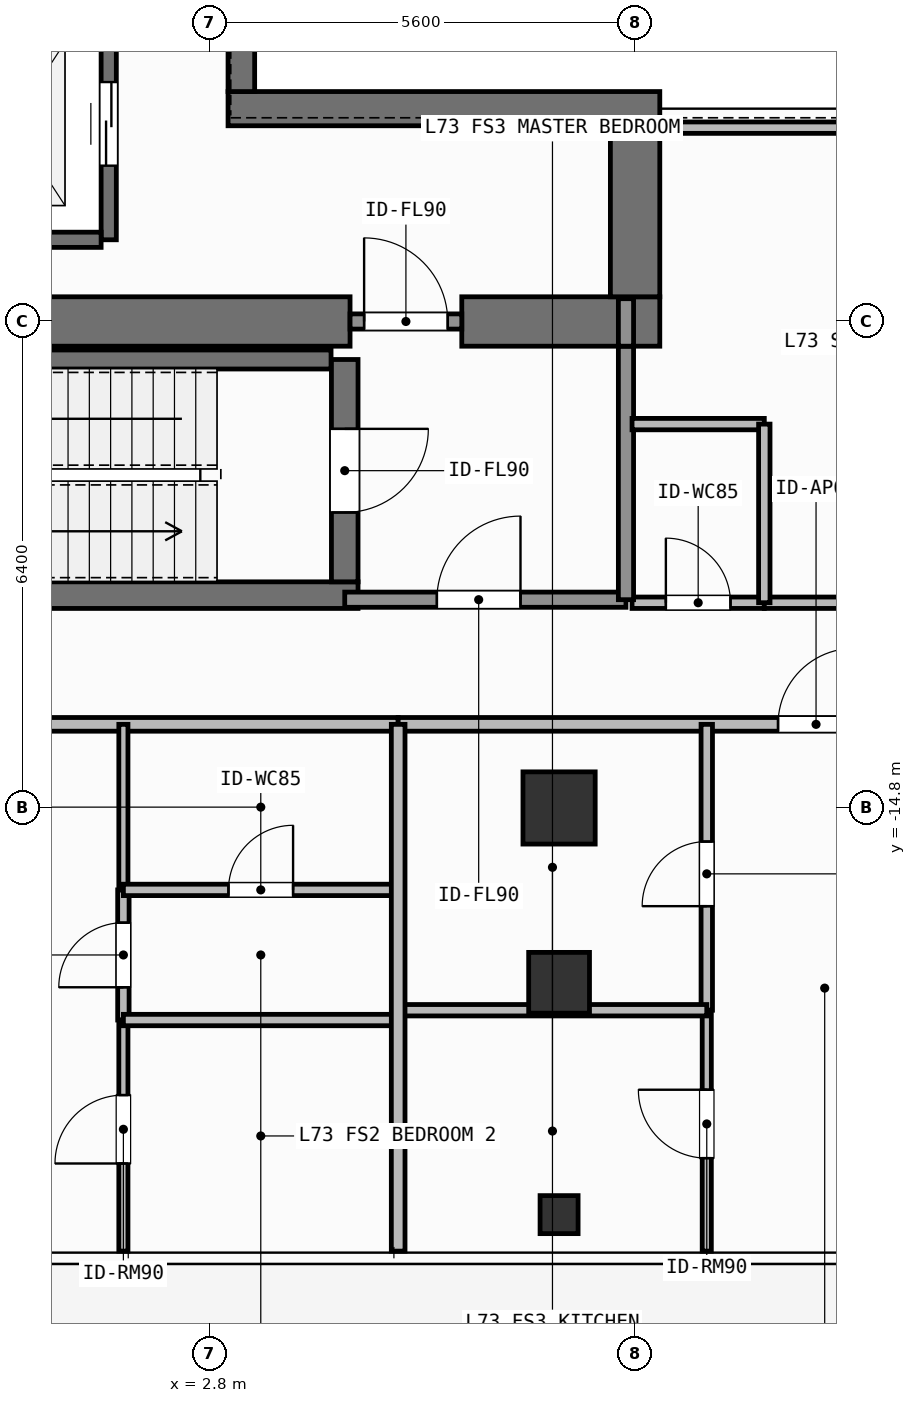
"""IFC4 building model, lengths in metres.
Left out: names, types, materials, properties, quantities, classifications, styles, units other than length and angle.
Written with IfcOpenShell. Run it as: python <this file> out.ifc"""

import sys

from ifc_helpers import new_model, si_unit, direction, frame, frame_2d, origin, origin_2d, place, context, subcontext, project, spatial, rectangle, hollow_rectangle, extrude, element, fill, save


model = new_model("IFC4")
c1 = context("Model", 3, precision=1e-05, world=origin(), true_north=direction((0.0, 1.0)))
c2 = subcontext(c1, "Body", "Model", "MODEL_VIEW")
j1 = project(units=[si_unit("LENGTHUNIT", "METRE"), si_unit("PLANEANGLEUNIT", "RADIAN")], contexts=[c1])
p1 = place(None, origin())
s1 = spatial("IfcSite", under=j1, at=p1, CompositionType="ELEMENT")
p2 = place(p1, origin())
s2 = spatial("IfcBuilding", under=s1, at=p2, CompositionType="ELEMENT")
p3 = place(p2, frame((0.0, 0.0, 297.6)))
s3 = spatial("IfcBuildingStorey", under=s2, at=p3, CompositionType="ELEMENT", Elevation=297.6)
p4 = place(p3, frame((-2.62, -8.4, 0.0), z_axis=(0.0, 0.0, 1.0), x_axis=(1.0, 0.0, 0.0)))
e1 = element("IfcWall", 1, at=p4, inside=s3, PredefinedType="SHEAR", context=c2, shape_type="SweptSolid", body=[
    extrude(rectangle(XDim=7.27, YDim=0.65, at=frame_2d((3.635, 0.0))), origin(), (0.0, 0.0, 1.0), 3.9),
])
p5 = place(p3, frame((6.12, -8.4, 0.0), z_axis=(0.0, 0.0, 1.0), x_axis=(1.0, 0.0, 0.0)))
e2 = element("IfcWall", 2, at=p5, inside=s3, PredefinedType="SHEAR", context=c2, shape_type="SweptSolid", body=[
    extrude(rectangle(XDim=2.605, YDim=0.65, at=frame_2d((1.302, 0.0))), origin(), (0.0, 0.0, 1.0), 3.9),
])
p6 = place(p3, frame((8.4, -8.075, 0.0), z_axis=(0.0, 0.0, 1.0), x_axis=(0.0, 1.0, 0.0)))
e3 = element("IfcWall", 3, at=p6, inside=s3, PredefinedType="SHEAR", context=c2, shape_type="SweptSolid", body=[
    extrude(rectangle(XDim=2.25, YDim=0.65, at=frame_2d((1.125, 0.0))), origin(), (0.0, 0.0, 1.0), 3.9),
])
p7 = place(p3, frame((3.045, -5.6, 0.0), z_axis=(0.0, 0.0, 1.0), x_axis=(1.0, 0.0, 0.0)))
e4 = element("IfcWall", 4, at=p7, inside=s3, PredefinedType="SHEAR", context=c2, shape_type="SweptSolid", body=[
    extrude(rectangle(XDim=5.68, YDim=0.45, at=frame_2d((2.84, 0.0))), origin(), (0.0, 0.0, 1.0), 3.9),
])
p8 = place(p3, frame((3.22, -5.375, 0.0), z_axis=(0.0, 0.0, 1.0), x_axis=(0.0, 1.0, 0.0)))
e5 = element("IfcWall", 5, at=p8, inside=s3, PredefinedType="SHEAR", context=c2, shape_type="SweptSolid", body=[
    extrude(rectangle(XDim=10.75, YDim=0.35, at=frame_2d((5.375, 0.0))), origin(), (0.0, 0.0, 1.0), 3.9),
])
p9 = place(p3, frame((-2.555, -12.0, 0.0), z_axis=(0.0, 0.0, 1.0), x_axis=(1.0, 0.0, 0.0)))
e6 = element("IfcWall", 6, at=p9, inside=s3, PredefinedType="SHEAR", context=c2, shape_type="SweptSolid", body=[
    extrude(rectangle(XDim=7.31, YDim=0.35, at=frame_2d((3.655, 0.0))), origin(), (0.0, 0.0, 1.0), 3.9),
])
p10 = place(p3, frame((-2.2, -8.9, 0.0), z_axis=(0.0, 0.0, 1.0), x_axis=(1.0, 0.0, 0.0)))
e7 = element("IfcWall", 7, at=p10, inside=s3, PredefinedType="SHEAR", context=c2, shape_type="SweptSolid", body=[
    extrude(rectangle(XDim=6.6, YDim=0.25, at=frame_2d((3.3, 0.0))), origin(), (0.0, 0.0, 1.0), 3.9),
])
p11 = place(p3, frame((4.58, -8.9, 0.0), z_axis=(0.0, 0.0, 1.0), x_axis=(0.0, -1.0, 0.0)))
e8 = element("IfcWall", 8, at=p11, inside=s3, PredefinedType="SHEAR", context=c2, shape_type="SweptSolid", body=[
    extrude(rectangle(XDim=2.925, YDim=0.35, at=frame_2d((1.462, 0.0))), origin(), (0.0, 0.0, 1.0), 3.9),
])
p12 = place(p11, frame((0.913, 0.0, 0.0)))
e9 = element("IfcOpeningElement", 9, at=p12, cuts=e8, PredefinedType="OPENING", context=c2, shape_type="SweptSolid", body=[
    extrude(rectangle(XDim=1.1, YDim=2.15, at=frame_2d((0.55, 1.075))), frame((0.0, 0.185, 0.0), z_axis=(0.0, -1.0, 0.0), x_axis=(1.0, 0.0, 0.0)), (0.0, 0.0, 1.0), 0.37),
])
p13 = place(p3, frame((7.4, -14.8, 0.0), z_axis=(0.0, 0.0, 1.0), x_axis=(1.0, 0.0, 0.0)))
e10 = element("IfcColumn", 10, at=p13, inside=s3, PredefinedType="COLUMN", context=c2, shape_type="SweptSolid", body=[
    extrude(rectangle(XDim=0.95, YDim=0.95, at=origin_2d()), origin(), (0.0, 0.0, 1.0), 3.9),
])
p14 = place(p3, frame((7.4, -17.1, 0.0), z_axis=(0.0, 0.0, 1.0), x_axis=(1.0, 0.0, 0.0)))
e11 = element("IfcColumn", 11, at=p14, inside=s3, PredefinedType="COLUMN", context=c2, shape_type="SweptSolid", body=[
    extrude(hollow_rectangle(XDim=0.8, YDim=0.8, WallThickness=0.036, at=origin_2d()), origin(), (0.0, 0.0, 1.0), 3.9),
])
p15 = place(p3, frame((7.4, -20.15, 0.0), z_axis=(0.0, 0.0, 1.0), x_axis=(1.0, 0.0, 0.0)))
e12 = element("IfcColumn", 12, at=p15, inside=s3, PredefinedType="COLUMN", context=c2, shape_type="SweptSolid", body=[
    extrude(hollow_rectangle(XDim=0.5, YDim=0.5, WallThickness=0.025, at=origin_2d()), origin(), (0.0, 0.0, 1.0), 3.9),
])
p16 = place(p3, frame((1.475, -7.325, 0.0), z_axis=(0.0, 0.0, 1.0), x_axis=(0.0, 1.0, 0.0)))
e13 = element("IfcWall", 13, at=p16, inside=s3, PredefinedType="SHEAR", context=c2, shape_type="SweptSolid", body=[
    extrude(rectangle(XDim=3.05, YDim=0.2, at=frame_2d((1.525, 0.0))), origin(), (0.0, 0.0, 1.0), 3.68),
])
p17 = place(p16, frame((0.975, 0.0, 0.0)))
e14 = element("IfcOpeningElement", 14, at=p17, cuts=e13, PredefinedType="OPENING", context=c2, shape_type="SweptSolid", body=[
    extrude(rectangle(XDim=1.1, YDim=2.2, at=frame_2d((0.55, 1.1))), frame((0.0, 0.11, 0.0), z_axis=(0.0, -1.0, 0.0), x_axis=(1.0, 0.0, 0.0)), (0.0, 0.0, 1.0), 0.22),
])
p18 = place(p3, frame((-0.975, -7.325, 0.0), z_axis=(0.0, 0.0, 1.0), x_axis=(1.0, 0.0, 0.0)))
e15 = element("IfcWall", 15, at=p18, inside=s3, PredefinedType="SHEAR", context=c2, shape_type="SweptSolid", body=[
    extrude(rectangle(XDim=2.35, YDim=0.2, at=frame_2d((1.175, 0.0))), origin(), (0.0, 0.0, 1.0), 3.68),
])
p19 = place(p3, frame((4.58, -12.06, 0.0), z_axis=(0.0, 0.0, 1.0), x_axis=(1.0, 0.0, 0.0)))
e16 = element("IfcWall", 16, at=p19, inside=s3, PredefinedType="SOLIDWALL", context=c2, shape_type="SweptSolid", body=[
    extrude(rectangle(XDim=3.7, YDim=0.2, at=frame_2d((1.85, 0.0))), origin(), (0.0, 0.0, 1.0), 3.68),
])
p20 = place(p19, frame((1.212, 0.0, 0.0)))
e17 = element("IfcOpeningElement", 17, at=p20, cuts=e16, PredefinedType="OPENING", context=c2, shape_type="SweptSolid", body=[
    extrude(rectangle(XDim=1.1, YDim=2.15, at=frame_2d((0.55, 1.075))), frame((0.0, 0.11, 0.0), z_axis=(0.0, -1.0, 0.0), x_axis=(1.0, 0.0, 0.0)), (0.0, 0.0, 1.0), 0.22),
])
p21 = place(p3, frame((4.65, -8.4, 0.0), z_axis=(0.0, 0.0, 1.0), x_axis=(1.0, 0.0, 0.0)))
e18 = element("IfcWall", 18, at=p21, inside=s3, PredefinedType="SOLIDWALL", context=c2, shape_type="SweptSolid", body=[
    extrude(rectangle(XDim=1.47, YDim=0.2, at=frame_2d((0.735, 0.0))), origin(), (0.0, 0.0, 1.0), 2.92),
])
p22 = place(p21, frame((0.185, 0.0, 0.0)))
e19 = element("IfcOpeningElement", 19, at=p22, cuts=e18, PredefinedType="OPENING", context=c2, shape_type="SweptSolid", body=[
    extrude(rectangle(XDim=1.1, YDim=2.15, at=frame_2d((0.55, 1.075))), frame((0.0, 0.11, 0.0), z_axis=(0.0, -1.0, 0.0), x_axis=(1.0, 0.0, 0.0)), (0.0, 0.0, 1.0), 0.22),
])
p23 = place(p3, frame((8.36, -12.1, 0.0), z_axis=(0.0, 0.0, 1.0), x_axis=(1.0, 0.0, 0.0)))
e20 = element("IfcWall", 20, at=p23, inside=s3, PredefinedType="PARTITIONING", context=c2, shape_type="SweptSolid", body=[
    extrude(rectangle(XDim=1.74, YDim=0.15, at=frame_2d((0.87, 0.0))), origin(), (0.0, 0.0, 1.0), 3.68),
])
p24 = place(p23, frame((0.445, 0.0, 0.0)))
e21 = element("IfcOpeningElement", 21, at=p24, cuts=e20, PredefinedType="OPENING", context=c2, shape_type="SweptSolid", body=[
    extrude(rectangle(XDim=0.85, YDim=2.1, at=frame_2d((0.425, 1.05))), frame((0.0, 0.085, 0.0), z_axis=(0.0, -1.0, 0.0), x_axis=(1.0, 0.0, 0.0)), (0.0, 0.0, 1.0), 0.17),
])
p25 = place(p3, frame((10.1, -12.1, 0.0), z_axis=(0.0, 0.0, 1.0), x_axis=(1.0, 0.0, 0.0)))
e22 = element("IfcWall", 22, at=p25, inside=s3, PredefinedType="PARTITIONING", context=c2, shape_type="SweptSolid", body=[
    extrude(rectangle(XDim=5.48, YDim=0.15, at=frame_2d((2.74, 0.0))), origin(), (0.0, 0.0, 1.0), 3.68),
])
p26 = place(p25, frame((2.29, 0.0, 0.0)))
e23 = element("IfcOpeningElement", 23, at=p26, cuts=e22, PredefinedType="OPENING", context=c2, shape_type="SweptSolid", body=[
    extrude(rectangle(XDim=0.9, YDim=2.1, at=frame_2d((0.45, 1.05))), frame((0.0, 0.085, 0.0), z_axis=(0.0, -1.0, 0.0), x_axis=(1.0, 0.0, 0.0)), (0.0, 0.0, 1.0), 0.17),
])
p27 = place(p3, frame((-10.04, -13.7, 0.0), z_axis=(0.0, 0.0, 1.0), x_axis=(1.0, 0.0, 0.0)))
e24 = element("IfcWall", 24, at=p27, inside=s3, PredefinedType="PARTITIONING", context=c2, shape_type="SweptSolid", body=[
    extrude(rectangle(XDim=15.323, YDim=0.18, at=frame_2d((7.662, 0.0))), origin(), (0.0, 0.0, 1.0), 3.68),
])
p28 = place(p27, frame((7.88, 0.0, 0.0)))
e25 = element("IfcOpeningElement", 25, at=p28, cuts=e24, PredefinedType="OPENING", context=c2, shape_type="SweptSolid", body=[
    extrude(rectangle(XDim=1.0, YDim=2.2, at=frame_2d((0.5, 1.1))), frame((0.0, 0.1, 0.0), z_axis=(0.0, -1.0, 0.0), x_axis=(1.0, 0.0, 0.0)), (0.0, 0.0, 1.0), 0.2),
])
p29 = place(p3, frame((1.668, -17.59, 0.0), z_axis=(0.0, 0.0, 1.0), x_axis=(0.0, 1.0, 0.0)))
e26 = element("IfcWall", 26, at=p29, inside=s3, PredefinedType="PARTITIONING", context=c2, shape_type="SweptSolid", body=[
    extrude(rectangle(XDim=1.712, YDim=0.15, at=frame_2d((0.856, 0.0))), origin(), (0.0, 0.0, 1.0), 3.68),
])
p30 = place(p29, frame((0.431, 0.0, 0.0)))
e27 = element("IfcOpeningElement", 27, at=p30, cuts=e26, PredefinedType="OPENING", context=c2, shape_type="SweptSolid", body=[
    extrude(rectangle(XDim=0.85, YDim=2.1, at=frame_2d((0.425, 1.05))), frame((0.0, 0.085, 0.0), z_axis=(0.0, -1.0, 0.0), x_axis=(1.0, 0.0, 0.0)), (0.0, 0.0, 1.0), 0.17),
])
p31 = place(p3, frame((1.668, -15.878, 0.0), z_axis=(0.0, 0.0, 1.0), x_axis=(0.0, 1.0, 0.0)))
e28 = element("IfcWall", 28, at=p31, inside=s3, PredefinedType="PARTITIONING", context=c2, shape_type="SweptSolid", body=[
    extrude(rectangle(XDim=2.178, YDim=0.12, at=frame_2d((1.089, 0.0))), origin(), (0.0, 0.0, 1.0), 3.68),
])
p32 = place(p3, frame((1.668, -20.63, 0.0), z_axis=(0.0, 0.0, 1.0), x_axis=(0.0, 1.0, 0.0)))
e29 = element("IfcWall", 29, at=p32, inside=s3, PredefinedType="PARTITIONING", context=c2, shape_type="SweptSolid", body=[
    extrude(rectangle(XDim=3.04, YDim=0.12, at=frame_2d((1.52, 0.0))), origin(), (0.0, 0.0, 1.0), 3.68),
])
p33 = place(p32, frame((1.153, 0.0, 0.0)))
e30 = element("IfcOpeningElement", 30, at=p33, cuts=e29, PredefinedType="OPENING", context=c2, shape_type="SweptSolid", body=[
    extrude(rectangle(XDim=0.9, YDim=2.1, at=frame_2d((0.45, 1.05))), frame((0.0, 0.07, 0.0), z_axis=(0.0, -1.0, 0.0), x_axis=(1.0, 0.0, 0.0)), (0.0, 0.0, 1.0), 0.14),
])
p34 = place(p3, frame((5.283, -13.7, 0.0), z_axis=(0.0, 0.0, 1.0), x_axis=(1.0, 0.0, 0.0)))
e31 = element("IfcWall", 31, at=p34, inside=s3, PredefinedType="PARTITIONING", context=c2, shape_type="SweptSolid", body=[
    extrude(rectangle(XDim=10.637, YDim=0.18, at=frame_2d((5.318, 0.0))), origin(), (0.0, 0.0, 1.0), 3.68),
])
p35 = place(p34, frame((4.998, 0.0, 0.0)))
e32 = element("IfcOpeningElement", 32, at=p35, cuts=e31, PredefinedType="OPENING", context=c2, shape_type="SweptSolid", body=[
    extrude(rectangle(XDim=1.0, YDim=2.2, at=frame_2d((0.5, 1.1))), frame((0.0, 0.1, 0.0), z_axis=(0.0, -1.0, 0.0), x_axis=(1.0, 0.0, 0.0)), (0.0, 0.0, 1.0), 0.2),
])
p36 = place(p3, frame((9.343, -17.461, 0.0), z_axis=(0.0, 0.0, 1.0), x_axis=(0.0, 1.0, 0.0)))
e33 = element("IfcWall", 33, at=p36, inside=s3, PredefinedType="PARTITIONING", context=c2, shape_type="SweptSolid", body=[
    extrude(rectangle(XDim=3.761, YDim=0.15, at=frame_2d((1.88, 0.0))), origin(), (0.0, 0.0, 1.0), 3.68),
])
p37 = place(p36, frame((1.369, 0.0, 0.0)))
e34 = element("IfcOpeningElement", 34, at=p37, cuts=e33, PredefinedType="OPENING", context=c2, shape_type="SweptSolid", body=[
    extrude(rectangle(XDim=0.85, YDim=2.1, at=frame_2d((0.425, 1.05))), frame((0.0, 0.085, 0.0), z_axis=(0.0, -1.0, 0.0), x_axis=(1.0, 0.0, 0.0)), (0.0, 0.0, 1.0), 0.17),
])
p38 = place(p3, frame((9.343, -20.63, 0.0), z_axis=(0.0, 0.0, 1.0), x_axis=(0.0, 1.0, 0.0)))
e35 = element("IfcWall", 35, at=p38, inside=s3, PredefinedType="PARTITIONING", context=c2, shape_type="SweptSolid", body=[
    extrude(rectangle(XDim=3.169, YDim=0.12, at=frame_2d((1.584, 0.0))), origin(), (0.0, 0.0, 1.0), 3.68),
])
p39 = place(p38, frame((1.223, 0.0, 0.0)))
e36 = element("IfcOpeningElement", 36, at=p39, cuts=e35, PredefinedType="OPENING", context=c2, shape_type="SweptSolid", body=[
    extrude(rectangle(XDim=0.9, YDim=2.1, at=frame_2d((0.45, 1.05))), frame((0.0, 0.07, 0.0), z_axis=(0.0, -1.0, 0.0), x_axis=(1.0, 0.0, 0.0)), (0.0, 0.0, 1.0), 0.14),
])
p40 = place(p3, frame((8.28, -12.06, 0.0), z_axis=(0.0, 0.0, 1.0), x_axis=(0.0, 1.0, 0.0)))
e37 = element("IfcWall", 37, at=p40, inside=s3, PredefinedType="SOLIDWALL", context=c2, shape_type="SweptSolid", body=[
    extrude(rectangle(XDim=3.335, YDim=0.2, at=frame_2d((1.667, 0.0))), origin(), (0.0, 0.0, 1.0), 3.68),
])
p41 = place(p3, frame((8.28, -8.725, 0.0), z_axis=(0.0, 0.0, 1.0), x_axis=(0.0, 1.0, 0.0)))
e38 = element("IfcWall", 38, at=p41, inside=s3, PredefinedType="SOLIDWALL", context=c2, shape_type="SweptSolid", body=[
    extrude(rectangle(XDim=0.625, YDim=0.2, at=frame_2d((0.312, 0.0))), origin(), (0.0, 0.0, 1.0), 3.68),
])
p42 = place(p3, frame((8.36, -9.75, 0.0), z_axis=(0.0, 0.0, 1.0), x_axis=(1.0, 0.0, 0.0)))
e39 = element("IfcWall", 39, at=p42, inside=s3, PredefinedType="PARTITIONING", context=c2, shape_type="SweptSolid", body=[
    extrude(rectangle(XDim=1.74, YDim=0.15, at=frame_2d((0.87, 0.0))), origin(), (0.0, 0.0, 1.0), 3.68),
])
p43 = place(p3, frame((10.1, -12.1, 0.0), z_axis=(0.0, 0.0, 1.0), x_axis=(0.0, 1.0, 0.0)))
e40 = element("IfcWall", 40, at=p43, inside=s3, PredefinedType="PARTITIONING", context=c2, shape_type="SweptSolid", body=[
    extrude(rectangle(XDim=2.35, YDim=0.15, at=frame_2d((1.175, 0.0))), origin(), (0.0, 0.0, 1.0), 3.68),
])
p44 = place(p3, frame((8.96, -5.85, 0.0), z_axis=(0.0, 0.0, 1.0), x_axis=(1.0, 0.0, 0.0)))
e41 = element("IfcWall", 41, at=p44, inside=s3, PredefinedType="PARTITIONING", context=c2, shape_type="SweptSolid", body=[
    extrude(rectangle(XDim=6.62, YDim=0.15, at=frame_2d((3.31, 0.0))), origin(), (0.0, 0.0, 1.0), 3.68),
])
p45 = place(p3, frame((1.668, -15.878, 0.0), z_axis=(0.0, 0.0, 1.0), x_axis=(1.0, 0.0, 0.0)))
e42 = element("IfcWall", 42, at=p45, inside=s3, PredefinedType="PARTITIONING", context=c2, shape_type="SweptSolid", body=[
    extrude(rectangle(XDim=3.615, YDim=0.15, at=frame_2d((1.808, 0.0))), origin(), (0.0, 0.0, 1.0), 3.68),
])
p46 = place(p45, frame((1.383, 0.0, 0.0)))
e43 = element("IfcOpeningElement", 43, at=p46, cuts=e42, PredefinedType="OPENING", context=c2, shape_type="SweptSolid", body=[
    extrude(rectangle(XDim=0.85, YDim=2.1, at=frame_2d((0.425, 1.05))), frame((0.0, 0.085, 0.0), z_axis=(0.0, -1.0, 0.0), x_axis=(1.0, 0.0, 0.0)), (0.0, 0.0, 1.0), 0.17),
])
p47 = place(p3, frame((1.668, -17.59, 0.0), z_axis=(0.0, 0.0, 1.0), x_axis=(1.0, 0.0, 0.0)))
e44 = element("IfcWall", 44, at=p47, inside=s3, PredefinedType="PARTITIONING", context=c2, shape_type="SweptSolid", body=[
    extrude(rectangle(XDim=3.615, YDim=0.15, at=frame_2d((1.808, 0.0))), origin(), (0.0, 0.0, 1.0), 3.68),
])
p48 = place(p3, frame((5.283, -17.461, 0.0), z_axis=(0.0, 0.0, 1.0), x_axis=(1.0, 0.0, 0.0)))
e45 = element("IfcWall", 45, at=p48, inside=s3, PredefinedType="PARTITIONING", context=c2, shape_type="SweptSolid", body=[
    extrude(rectangle(XDim=4.06, YDim=0.15, at=frame_2d((2.03, 0.0))), origin(), (0.0, 0.0, 1.0), 3.68),
])
p49 = place(p3, frame((5.283, -20.63, 0.0), z_axis=(0.0, 0.0, 1.0), x_axis=(0.0, 1.0, 0.0)))
e46 = element("IfcWall", 46, at=p49, inside=s3, PredefinedType="PARTITIONING", context=c2, shape_type="SweptSolid", body=[
    extrude(rectangle(XDim=6.93, YDim=0.18, at=frame_2d((3.465, 0.0))), origin(), (0.0, 0.0, 1.0), 3.68),
])
p50 = place(p17, origin())
e47 = element("IfcDoor", 47, at=p50, inside=s3, OperationType="SLIDING_TO_LEFT", PredefinedType="DOOR", context=c2, shape_type="SweptSolid", body=[
    extrude(rectangle(XDim=1.1, YDim=2.2, at=frame_2d((0.55, 1.1))), frame((0.0, 0.025, 0.0), z_axis=(0.0, -1.0, 0.0), x_axis=(1.0, 0.0, 0.0)), (0.0, 0.0, 1.0), 0.05),
])
fill(e14, e47)
p51 = place(p12, origin())
e48 = element("IfcDoor", 48, at=p51, inside=s3, OperationType="SINGLE_SWING_LEFT", PredefinedType="DOOR", context=c2, shape_type="SweptSolid", body=[
    extrude(rectangle(XDim=1.1, YDim=2.15, at=frame_2d((0.55, 1.075))), frame((0.0, 0.025, 0.0), z_axis=(0.0, -1.0, 0.0), x_axis=(1.0, 0.0, 0.0)), (0.0, 0.0, 1.0), 0.05),
])
fill(e9, e48)
p52 = place(p20, origin())
e49 = element("IfcDoor", 49, at=p52, inside=s3, OperationType="SINGLE_SWING_RIGHT", PredefinedType="DOOR", context=c2, shape_type="SweptSolid", body=[
    extrude(rectangle(XDim=1.1, YDim=2.15, at=frame_2d((0.55, 1.075))), frame((0.0, 0.025, 0.0), z_axis=(0.0, -1.0, 0.0), x_axis=(1.0, 0.0, 0.0)), (0.0, 0.0, 1.0), 0.05),
])
fill(e17, e49)
p53 = place(p22, origin())
e50 = element("IfcDoor", 50, at=p53, inside=s3, OperationType="SINGLE_SWING_LEFT", PredefinedType="DOOR", context=c2, shape_type="SweptSolid", body=[
    extrude(rectangle(XDim=1.1, YDim=2.15, at=frame_2d((0.55, 1.075))), frame((0.0, 0.025, 0.0), z_axis=(0.0, -1.0, 0.0), x_axis=(1.0, 0.0, 0.0)), (0.0, 0.0, 1.0), 0.05),
])
fill(e19, e50)
p54 = place(p24, origin())
e51 = element("IfcDoor", 51, at=p54, inside=s3, OperationType="SINGLE_SWING_LEFT", PredefinedType="DOOR", context=c2, shape_type="SweptSolid", body=[
    extrude(rectangle(XDim=0.85, YDim=2.1, at=frame_2d((0.425, 1.05))), frame((0.0, 0.025, 0.0), z_axis=(0.0, -1.0, 0.0), x_axis=(1.0, 0.0, 0.0)), (0.0, 0.0, 1.0), 0.05),
])
fill(e21, e51)
p55 = place(p30, origin())
e52 = element("IfcDoor", 52, at=p55, inside=s3, OperationType="SINGLE_SWING_LEFT", PredefinedType="DOOR", context=c2, shape_type="SweptSolid", body=[
    extrude(rectangle(XDim=0.85, YDim=2.1, at=frame_2d((0.425, 1.05))), frame((0.0, 0.025, 0.0), z_axis=(0.0, -1.0, 0.0), x_axis=(1.0, 0.0, 0.0)), (0.0, 0.0, 1.0), 0.05),
])
fill(e27, e52)
p56 = place(p46, origin())
e53 = element("IfcDoor", 53, at=p56, inside=s3, OperationType="SINGLE_SWING_RIGHT", PredefinedType="DOOR", context=c2, shape_type="SweptSolid", body=[
    extrude(rectangle(XDim=0.85, YDim=2.1, at=frame_2d((0.425, 1.05))), frame((0.0, 0.025, 0.0), z_axis=(0.0, -1.0, 0.0), x_axis=(1.0, 0.0, 0.0)), (0.0, 0.0, 1.0), 0.05),
])
fill(e43, e53)
p57 = place(p33, origin())
e54 = element("IfcDoor", 54, at=p57, inside=s3, OperationType="SINGLE_SWING_LEFT", PredefinedType="DOOR", context=c2, shape_type="SweptSolid", body=[
    extrude(rectangle(XDim=0.9, YDim=2.1, at=frame_2d((0.45, 1.05))), frame((0.0, 0.025, 0.0), z_axis=(0.0, -1.0, 0.0), x_axis=(1.0, 0.0, 0.0)), (0.0, 0.0, 1.0), 0.05),
])
fill(e30, e54)
p58 = place(p35, origin())
e55 = element("IfcDoor", 55, at=p58, inside=s3, OperationType="SINGLE_SWING_RIGHT", PredefinedType="DOOR", context=c2, shape_type="SweptSolid", body=[
    extrude(rectangle(XDim=1.0, YDim=2.2, at=frame_2d((0.5, 1.1))), frame((0.0, 0.025, 0.0), z_axis=(0.0, -1.0, 0.0), x_axis=(1.0, 0.0, 0.0)), (0.0, 0.0, 1.0), 0.05),
])
fill(e32, e55)
p59 = place(p37, origin())
e56 = element("IfcDoor", 56, at=p59, inside=s3, OperationType="SINGLE_SWING_LEFT", PredefinedType="DOOR", context=c2, shape_type="SweptSolid", body=[
    extrude(rectangle(XDim=0.85, YDim=2.1, at=frame_2d((0.425, 1.05))), frame((0.0, 0.025, 0.0), z_axis=(0.0, -1.0, 0.0), x_axis=(1.0, 0.0, 0.0)), (0.0, 0.0, 1.0), 0.05),
])
fill(e34, e56)
p60 = place(p39, origin())
e57 = element("IfcDoor", 57, at=p60, inside=s3, OperationType="SINGLE_SWING_RIGHT", PredefinedType="DOOR", context=c2, shape_type="SweptSolid", body=[
    extrude(rectangle(XDim=0.9, YDim=2.1, at=frame_2d((0.45, 1.05))), frame((0.0, 0.025, 0.0), z_axis=(0.0, -1.0, 0.0), x_axis=(1.0, 0.0, 0.0)), (0.0, 0.0, 1.0), 0.05),
])
fill(e36, e57)
save(model, sys.argv[1])
